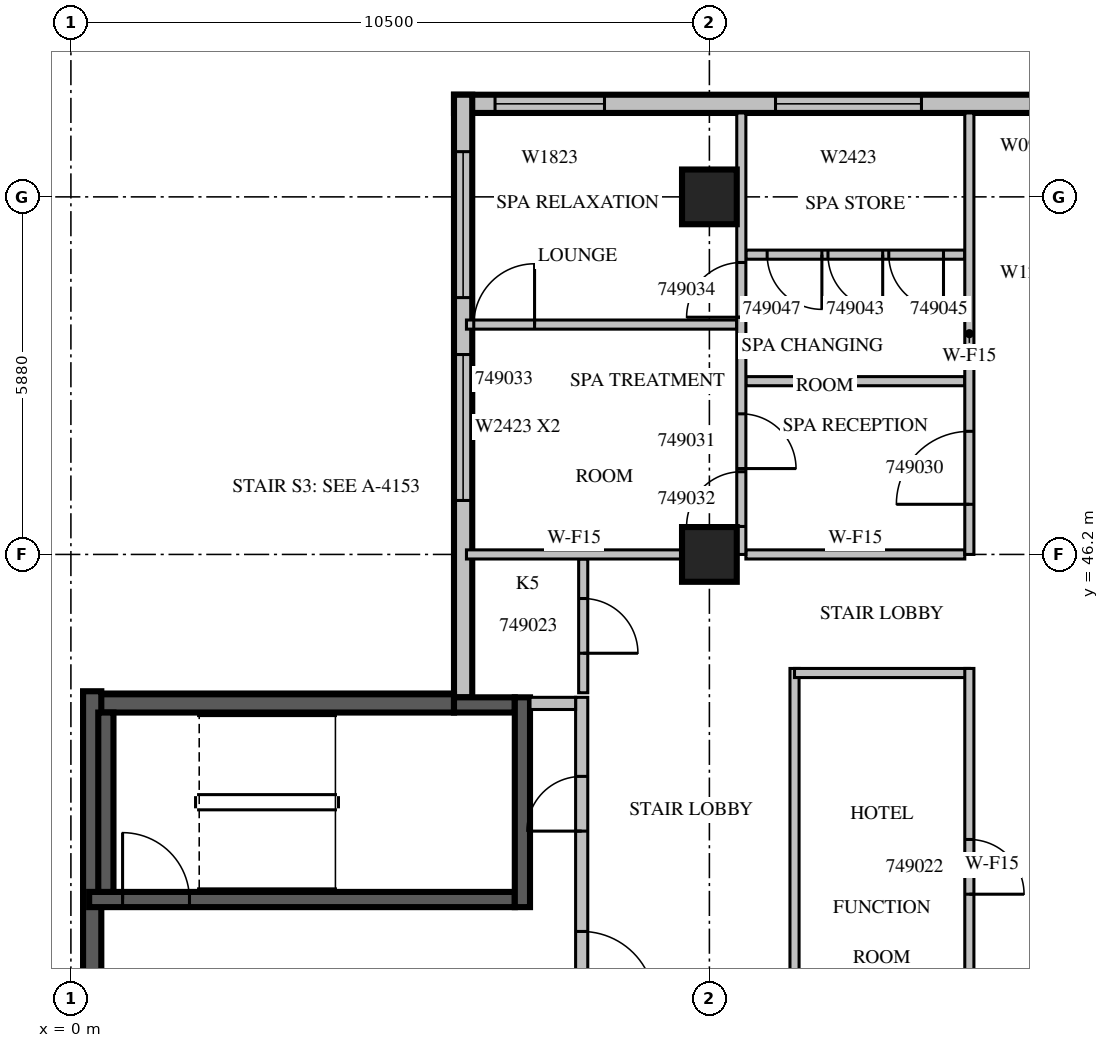
"""IFC4 building model, lengths in metres.
Left out: names, types, materials, properties, quantities, classifications, styles, units other than length and angle.
Written with IfcOpenShell. Run it as: python <this file> out.ifc"""

import sys

from ifc_helpers import new_model, si_unit, direction, frame, frame_2d, origin, origin_2d, place, context, subcontext, project, spatial, rectangle, extrude, source, transform, mapped, element, fill, save


model = new_model("IFC4")
c1 = context("Model", 3, precision=1e-05, world=origin(), true_north=direction((0.0, 1.0)))
c2 = subcontext(c1, "Body", "Model", "MODEL_VIEW")
j1 = project(units=[si_unit("LENGTHUNIT", "METRE"), si_unit("PLANEANGLEUNIT", "RADIAN")], contexts=[c1])
p1 = place(None, origin())
s1 = spatial("IfcSite", under=j1, at=p1, CompositionType="ELEMENT")
p2 = place(p1, origin())
s2 = spatial("IfcBuilding", under=s1, at=p2, CompositionType="ELEMENT")
p3 = place(p2, frame((0.0, 0.0, 219.6)))
s3 = spatial("IfcBuildingStorey", under=s2, at=p3, CompositionType="ELEMENT", Elevation=219.6)
m1 = source(origin(), c2, "Body", "SweptSolid", [
    extrude(rectangle(XDim=0.9, YDim=0.9, at=origin_2d()), origin(), (0.0, 0.0, 1.0), 3.8),
])
for number, where, z_axis, x_axis in (
    (1, (10.5, 46.2, 0.0), (0.0, 0.0, 1.0), (1.0, 0.0, 0.0)),
    (2, (10.5, 52.08, 0.0), (0.0, 0.0, 1.0), (1.0, 0.0, 0.0)),
):
    element("IfcColumn", number, at=place(p3, frame(where, z_axis=z_axis, x_axis=x_axis)), inside=s3, PredefinedType="COLUMN", context=c2, shape_type="MappedRepresentation", body=[
        mapped(m1, transform((0.0, 0.0, 0.0), scale=1.0)),
    ])
m2 = source(origin(), c2, "Body", "SweptSolid", [
    extrude(rectangle(XDim=10.5, YDim=0.3, at=frame_2d((5.25, 0.0))), origin(), (0.0, 0.0, 1.0), 3.4),
])
p4 = place(p3, frame((16.8, 53.61, 0.0), z_axis=(0.0, 0.0, 1.0), x_axis=(-1.0, 0.0, 0.0)))
e3 = element("IfcWall", 3, at=p4, inside=s3, PredefinedType="STANDARD", context=c2, shape_type="MappedRepresentation", body=[
    mapped(m2, transform((0.0, 0.0, 0.0), scale=1.0)),
])
m3 = source(origin(), c2, "Body", "SweptSolid", [
    extrude(rectangle(XDim=1.8, YDim=2.3, at=frame_2d((0.9, 1.15))), frame((0.0, 0.16, 0.0), z_axis=(0.0, -1.0, 0.0), x_axis=(1.0, 0.0, 0.0)), (0.0, 0.0, 1.0), 0.32),
])
p5 = place(p4, frame((8.025, 0.0, 0.6)))
e4 = element("IfcOpeningElement", 4, at=p5, cuts=e3, PredefinedType="OPENING", context=c2, shape_type="MappedRepresentation", body=[
    mapped(m3, transform((0.0, 0.0, 0.0), scale=1.0)),
])
m4 = source(origin(), c2, "Body", "SweptSolid", [
    extrude(rectangle(XDim=2.4, YDim=2.3, at=frame_2d((1.2, 1.15))), frame((0.0, 0.16, 0.0), z_axis=(0.0, -1.0, 0.0), x_axis=(1.0, 0.0, 0.0)), (0.0, 0.0, 1.0), 0.32),
])
p6 = place(p4, frame((2.812, 0.0, 0.6)))
e5 = element("IfcOpeningElement", 5, at=p6, cuts=e3, PredefinedType="OPENING", context=c2, shape_type="MappedRepresentation", body=[
    mapped(m4, transform((0.0, 0.0, 0.0), scale=1.0)),
])
m5 = source(origin(), c2, "Body", "SweptSolid", [
    extrude(rectangle(XDim=9.91, YDim=0.3, at=frame_2d((4.955, 0.0))), origin(), (0.0, 0.0, 1.0), 3.4),
])
p7 = place(p3, frame((6.45, 53.76, 0.0), z_axis=(0.0, 0.0, 1.0), x_axis=(0.0, -1.0, 0.0)))
e6 = element("IfcWall", 6, at=p7, inside=s3, PredefinedType="STANDARD", context=c2, shape_type="MappedRepresentation", body=[
    mapped(m5, transform((0.0, 0.0, 0.0), scale=1.0)),
])
p8 = place(p7, frame((4.272, 0.0, 0.6)))
e7 = element("IfcOpeningElement", 7, at=p8, cuts=e6, PredefinedType="OPENING", context=c2, shape_type="MappedRepresentation", body=[
    mapped(m4, transform((0.0, 0.0, 0.0), scale=1.0)),
])
p9 = place(p7, frame((0.936, 0.0, 0.6)))
e8 = element("IfcOpeningElement", 8, at=p9, cuts=e6, PredefinedType="OPENING", context=c2, shape_type="MappedRepresentation", body=[
    mapped(m4, transform((0.0, 0.0, 0.0), scale=1.0)),
])
m6 = source(origin(), c2, "Body", "SweptSolid", [
    extrude(rectangle(XDim=6.1, YDim=0.3, at=frame_2d((3.05, 0.0))), origin(), (0.0, 0.0, 1.0), 3.4),
])
p10 = place(p3, frame((6.3, 43.75, 0.0), z_axis=(0.0, 0.0, 1.0), x_axis=(-1.0, 0.0, 0.0)))
e9 = element("IfcWall", 9, at=p10, inside=s3, PredefinedType="SOLIDWALL", context=c2, shape_type="MappedRepresentation", body=[
    mapped(m6, transform((0.0, 0.0, 0.0), scale=1.0)),
])
m7 = source(origin(), c2, "Body", "SweptSolid", [
    extrude(rectangle(XDim=5.65, YDim=0.3, at=frame_2d((2.825, 0.0))), origin(), (0.0, 0.0, 1.0), 3.4),
])
p11 = place(p3, frame((0.35, 43.95, 0.0), z_axis=(0.0, 0.0, 1.0), x_axis=(0.0, -1.0, 0.0)))
e10 = element("IfcWall", 10, at=p11, inside=s3, PredefinedType="SOLIDWALL", context=c2, shape_type="MappedRepresentation", body=[
    mapped(m7, transform((0.0, 0.0, 0.0), scale=1.0)),
])
m8 = source(origin(), c2, "Body", "SweptSolid", [
    extrude(rectangle(XDim=7.0, YDim=0.25, at=frame_2d((3.5, 0.0))), origin(), (0.0, 0.0, 1.0), 3.4),
])
p12 = place(p3, frame((0.3, 40.525, 0.0), z_axis=(0.0, 0.0, 1.0), x_axis=(1.0, 0.0, 0.0)))
e11 = element("IfcWall", 11, at=p12, inside=s3, PredefinedType="SOLIDWALL", context=c2, shape_type="MappedRepresentation", body=[
    mapped(m8, transform((0.0, 0.0, 0.0), scale=1.0)),
])
m9 = source(origin(), c2, "Body", "SweptSolid", [
    extrude(rectangle(XDim=1.1, YDim=2.1, at=frame_2d((0.55, 1.05))), frame((0.0, 0.135, 0.0), z_axis=(0.0, -1.0, 0.0), x_axis=(1.0, 0.0, 0.0)), (0.0, 0.0, 1.0), 0.27),
])
p13 = place(p12, frame((0.55, 0.0, 0.0)))
e12 = element("IfcOpeningElement", 12, at=p13, cuts=e11, PredefinedType="OPENING", context=c2, shape_type="MappedRepresentation", body=[
    mapped(m9, transform((0.0, 0.0, 0.0), scale=1.0)),
])
m10 = source(origin(), c2, "Body", "SweptSolid", [
    extrude(rectangle(XDim=1.0, YDim=0.25, at=frame_2d((0.5, 0.0))), origin(), (0.0, 0.0, 1.0), 3.4),
])
p14 = place(p3, frame((6.3, 43.725, 0.0), z_axis=(0.0, 0.0, 1.0), x_axis=(1.0, 0.0, 0.0)))
e13 = element("IfcWall", 13, at=p14, inside=s3, PredefinedType="SOLIDWALL", context=c2, shape_type="MappedRepresentation", body=[
    mapped(m10, transform((0.0, 0.0, 0.0), scale=1.0)),
])
m11 = source(origin(), c2, "Body", "SweptSolid", [
    extrude(rectangle(XDim=3.45, YDim=0.25, at=frame_2d((1.725, 0.0))), origin(), (0.0, 0.0, 1.0), 3.4),
])
p15 = place(p3, frame((7.425, 40.4, 0.0), z_axis=(0.0, 0.0, 1.0), x_axis=(0.0, 1.0, 0.0)))
e14 = element("IfcWall", 14, at=p15, inside=s3, PredefinedType="SOLIDWALL", context=c2, shape_type="MappedRepresentation", body=[
    mapped(m11, transform((0.0, 0.0, 0.0), scale=1.0)),
])
m12 = source(origin(), c2, "Body", "SweptSolid", [
    extrude(rectangle(XDim=2.95, YDim=0.25, at=frame_2d((1.475, 0.0))), origin(), (0.0, 0.0, 1.0), 3.4),
])
p16 = place(p3, frame((0.575, 40.65, 0.0), z_axis=(0.0, 0.0, 1.0), x_axis=(0.0, 1.0, 0.0)))
e15 = element("IfcWall", 15, at=p16, inside=s3, PredefinedType="SOLIDWALL", context=c2, shape_type="MappedRepresentation", body=[
    mapped(m12, transform((0.0, 0.0, 0.0), scale=1.0)),
])
m13 = source(origin(), c2, "Body", "SweptSolid", [
    extrude(rectangle(XDim=5.45, YDim=0.2, at=frame_2d((2.725, 0.0))), origin(), (0.0, 0.0, 1.0), 3.4),
])
p17 = place(p3, frame((8.4, 38.4, 0.0), z_axis=(0.0, 0.0, 1.0), x_axis=(0.0, 1.0, 0.0)))
e16 = element("IfcWall", 16, at=p17, inside=s3, PredefinedType="PARTITIONING", context=c2, shape_type="MappedRepresentation", body=[
    mapped(m13, transform((0.0, 0.0, 0.0), scale=1.0)),
])
m14 = source(origin(), c2, "Body", "SweptSolid", [
    extrude(rectangle(XDim=1.2, YDim=2.1, at=frame_2d((0.6, 1.05))), frame((0.0, 0.11, 0.0), z_axis=(0.0, -1.0, 0.0), x_axis=(1.0, 0.0, 0.0)), (0.0, 0.0, 1.0), 0.22),
])
p18 = place(p17, frame((0.4, 0.0, 0.0)))
e17 = element("IfcOpeningElement", 17, at=p18, cuts=e16, PredefinedType="OPENING", context=c2, shape_type="MappedRepresentation", body=[
    mapped(m14, transform((0.0, 0.0, 0.0), scale=1.0)),
])
m15 = source(origin(), c2, "Body", "SweptSolid", [
    extrude(rectangle(XDim=0.9, YDim=2.1, at=frame_2d((0.45, 1.05))), frame((0.0, 0.11, 0.0), z_axis=(0.0, -1.0, 0.0), x_axis=(1.0, 0.0, 0.0)), (0.0, 0.0, 1.0), 0.22),
])
p19 = place(p17, frame((3.25, 0.0, 0.0)))
e18 = element("IfcOpeningElement", 18, at=p19, cuts=e16, PredefinedType="OPENING", context=c2, shape_type="MappedRepresentation", body=[
    mapped(m15, transform((0.0, 0.0, 0.0), scale=1.0)),
])
m16 = source(origin(), c2, "Body", "SweptSolid", [
    extrude(rectangle(XDim=0.75, YDim=0.2, at=frame_2d((0.375, 0.0))), origin(), (0.0, 0.0, 1.0), 3.4),
])
p20 = place(p3, frame((7.55, 43.75, 0.0), z_axis=(0.0, 0.0, 1.0), x_axis=(1.0, 0.0, 0.0)))
e19 = element("IfcWall", 19, at=p20, inside=s3, PredefinedType="PARTITIONING", context=c2, shape_type="MappedRepresentation", body=[
    mapped(m16, transform((0.0, 0.0, 0.0), scale=1.0)),
])
m17 = source(origin(), c2, "Body", "SweptSolid", [
    extrude(rectangle(XDim=6.45, YDim=0.15, at=frame_2d((3.225, 0.0))), origin(), (0.0, 0.0, 1.0), 3.4),
])
p21 = place(p3, frame((11.9, 44.325, 0.0), z_axis=(0.0, 0.0, 1.0), x_axis=(0.0, -1.0, 0.0)))
e20 = element("IfcWall", 20, at=p21, inside=s3, PredefinedType="PARTITIONING", context=c2, shape_type="MappedRepresentation", body=[
    mapped(m17, transform((0.0, 0.0, 0.0), scale=1.0)),
])
m18 = source(origin(), c2, "Body", "SweptSolid", [
    extrude(rectangle(XDim=2.875, YDim=0.15, at=frame_2d((1.438, 0.0))), origin(), (0.0, 0.0, 1.0), 3.4),
])
p22 = place(p3, frame((14.775, 44.25, 0.0), z_axis=(0.0, 0.0, 1.0), x_axis=(-1.0, 0.0, 0.0)))
e21 = element("IfcWall", 21, at=p22, inside=s3, PredefinedType="PARTITIONING", context=c2, shape_type="MappedRepresentation", body=[
    mapped(m18, transform((0.0, 0.0, 0.0), scale=1.0)),
])
p23 = place(p3, frame((14.775, 37.875, 0.0), z_axis=(0.0, 0.0, 1.0), x_axis=(0.0, 1.0, 0.0)))
e22 = element("IfcWall", 22, at=p23, inside=s3, PredefinedType="PARTITIONING", context=c2, shape_type="MappedRepresentation", body=[
    mapped(m17, transform((0.0, 0.0, 0.0), scale=1.0)),
])
m19 = source(origin(), c2, "Body", "SweptSolid", [
    extrude(rectangle(XDim=0.9, YDim=2.1, at=frame_2d((0.45, 1.05))), frame((0.0, 0.085, 0.0), z_axis=(0.0, -1.0, 0.0), x_axis=(1.0, 0.0, 0.0)), (0.0, 0.0, 1.0), 0.17),
])
p24 = place(p23, frame((2.737, 0.0, 0.0)))
e23 = element("IfcOpeningElement", 23, at=p24, cuts=e22, PredefinedType="OPENING", context=c2, shape_type="MappedRepresentation", body=[
    mapped(m19, transform((0.0, 0.0, 0.0), scale=1.0)),
])
m20 = source(origin(), c2, "Body", "SweptSolid", [
    extrude(rectangle(XDim=2.2, YDim=0.15, at=frame_2d((1.1, 0.0))), origin(), (0.0, 0.0, 1.0), 3.4),
])
p25 = place(p3, frame((8.425, 43.925, 0.0), z_axis=(0.0, 0.0, 1.0), x_axis=(0.0, 1.0, 0.0)))
e24 = element("IfcWall", 24, at=p25, inside=s3, PredefinedType="PARTITIONING", context=c2, shape_type="MappedRepresentation", body=[
    mapped(m20, transform((0.0, 0.0, 0.0), scale=1.0)),
])
p26 = place(p25, frame((0.65, 0.0, 0.0)))
e25 = element("IfcOpeningElement", 25, at=p26, cuts=e24, PredefinedType="OPENING", context=c2, shape_type="MappedRepresentation", body=[
    mapped(m19, transform((0.0, 0.0, 0.0), scale=1.0)),
])
m21 = source(origin(), c2, "Body", "SweptSolid", [
    extrude(rectangle(XDim=4.445, YDim=0.15, at=frame_2d((2.223, 0.0))), origin(), (0.0, 0.0, 1.0), 3.4),
])
p27 = place(p3, frame((10.95, 49.98, 0.0), z_axis=(0.0, 0.0, 1.0), x_axis=(-1.0, 0.0, 0.0)))
e26 = element("IfcWall", 26, at=p27, inside=s3, PredefinedType="PARTITIONING", context=c2, shape_type="MappedRepresentation", body=[
    mapped(m21, transform((0.0, 0.0, 0.0), scale=1.0)),
])
m22 = source(origin(), c2, "Body", "SweptSolid", [
    extrude(rectangle(XDim=1.0, YDim=2.1, at=frame_2d((0.5, 1.05))), frame((0.0, 0.085, 0.0), z_axis=(0.0, -1.0, 0.0), x_axis=(1.0, 0.0, 0.0)), (0.0, 0.0, 1.0), 0.17),
])
p28 = place(p27, frame((3.325, 0.0, 0.0)))
e27 = element("IfcOpeningElement", 27, at=p28, cuts=e26, PredefinedType="OPENING", context=c2, shape_type="MappedRepresentation", body=[
    mapped(m22, transform((0.0, 0.0, 0.0), scale=1.0)),
])
m23 = source(origin(), c2, "Body", "SweptSolid", [
    extrude(rectangle(XDim=3.6, YDim=0.15, at=frame_2d((1.8, 0.0))), origin(), (0.0, 0.0, 1.0), 3.4),
])
p29 = place(p3, frame((14.7, 49.049, 0.0), z_axis=(0.0, 0.0, 1.0), x_axis=(-1.0, 0.0, 0.0)))
e28 = element("IfcWall", 28, at=p29, inside=s3, PredefinedType="PARTITIONING", context=c2, shape_type="MappedRepresentation", body=[
    mapped(m23, transform((0.0, 0.0, 0.0), scale=1.0)),
])
p30 = place(p3, frame((14.7, 51.13, 0.0), z_axis=(0.0, 0.0, 1.0), x_axis=(-1.0, 0.0, 0.0)))
e29 = element("IfcWall", 29, at=p30, inside=s3, PredefinedType="PARTITIONING", context=c2, shape_type="MappedRepresentation", body=[
    mapped(m23, transform((0.0, 0.0, 0.0), scale=1.0)),
])
p31 = place(p30, frame((1.35, 0.0, 0.0)))
e30 = element("IfcOpeningElement", 30, at=p31, cuts=e29, PredefinedType="OPENING", context=c2, shape_type="MappedRepresentation", body=[
    mapped(m19, transform((0.0, 0.0, 0.0), scale=1.0)),
])
p32 = place(p30, frame((0.35, 0.0, 0.0)))
e31 = element("IfcOpeningElement", 31, at=p32, cuts=e29, PredefinedType="OPENING", context=c2, shape_type="MappedRepresentation", body=[
    mapped(m19, transform((0.0, 0.0, 0.0), scale=1.0)),
])
p33 = place(p30, frame((2.35, 0.0, 0.0)))
e32 = element("IfcOpeningElement", 32, at=p33, cuts=e29, PredefinedType="OPENING", context=c2, shape_type="MappedRepresentation", body=[
    mapped(m19, transform((0.0, 0.0, 0.0), scale=1.0)),
])
m24 = source(origin(), c2, "Body", "SweptSolid", [
    extrude(rectangle(XDim=3.546, YDim=0.15, at=frame_2d((1.773, 0.0))), origin(), (0.0, 0.0, 1.0), 3.4),
])
p34 = place(p3, frame((10.051, 46.2, 0.0), z_axis=(0.0, 0.0, 1.0), x_axis=(-1.0, 0.0, 0.0)))
e33 = element("IfcWall", 33, at=p34, inside=s3, PredefinedType="PARTITIONING", context=c2, shape_type="MappedRepresentation", body=[
    mapped(m24, transform((0.0, 0.0, 0.0), scale=1.0)),
])
p35 = place(p3, frame((14.7, 46.2, 0.0), z_axis=(0.0, 0.0, 1.0), x_axis=(-1.0, 0.0, 0.0)))
e34 = element("IfcWall", 34, at=p35, inside=s3, PredefinedType="PARTITIONING", context=c2, shape_type="MappedRepresentation", body=[
    mapped(m23, transform((0.0, 0.0, 0.0), scale=1.0)),
])
m25 = source(origin(), c2, "Body", "SweptSolid", [
    extrude(rectangle(XDim=7.26, YDim=0.15, at=frame_2d((3.63, 0.0))), origin(), (0.0, 0.0, 1.0), 3.4),
])
p36 = place(p3, frame((11.025, 46.2, 0.0), z_axis=(0.0, 0.0, 1.0), x_axis=(0.0, 1.0, 0.0)))
e35 = element("IfcWall", 35, at=p36, inside=s3, PredefinedType="PARTITIONING", context=c2, shape_type="MappedRepresentation", body=[
    mapped(m25, transform((0.0, 0.0, 0.0), scale=1.0)),
])
p37 = place(p36, frame((1.412, 0.0, 0.0)))
e36 = element("IfcOpeningElement", 36, at=p37, cuts=e35, PredefinedType="OPENING", context=c2, shape_type="MappedRepresentation", body=[
    mapped(m19, transform((0.0, 0.0, 0.0), scale=1.0)),
])
p38 = place(p36, frame((0.46, 0.0, 0.0)))
e37 = element("IfcOpeningElement", 37, at=p38, cuts=e35, PredefinedType="OPENING", context=c2, shape_type="MappedRepresentation", body=[
    mapped(m19, transform((0.0, 0.0, 0.0), scale=1.0)),
])
p39 = place(p36, frame((3.901, 0.0, 0.0)))
e38 = element("IfcOpeningElement", 38, at=p39, cuts=e35, PredefinedType="OPENING", context=c2, shape_type="MappedRepresentation", body=[
    mapped(m19, transform((0.0, 0.0, 0.0), scale=1.0)),
])
p40 = place(p3, frame((14.775, 46.2, 0.0), z_axis=(0.0, 0.0, 1.0), x_axis=(0.0, 1.0, 0.0)))
e39 = element("IfcWall", 39, at=p40, inside=s3, PredefinedType="PARTITIONING", context=c2, shape_type="MappedRepresentation", body=[
    mapped(m25, transform((0.0, 0.0, 0.0), scale=1.0)),
])
m26 = source(origin(), c2, "Body", "SweptSolid", [
    extrude(rectangle(XDim=1.2, YDim=2.1, at=frame_2d((0.6, 1.05))), frame((0.0, 0.085, 0.0), z_axis=(0.0, -1.0, 0.0), x_axis=(1.0, 0.0, 0.0)), (0.0, 0.0, 1.0), 0.17),
])
p41 = place(p40, frame((0.825, 0.0, 0.0)))
e40 = element("IfcOpeningElement", 40, at=p41, cuts=e39, PredefinedType="OPENING", context=c2, shape_type="MappedRepresentation", body=[
    mapped(m26, transform((0.0, 0.0, 0.0), scale=1.0)),
])
m27 = source(origin(), c2, "Body", "SweptSolid", [
    extrude(rectangle(XDim=1.8, YDim=2.3, at=frame_2d((0.9, 1.15))), frame((0.0, 0.03, 0.0), z_axis=(0.0, -1.0, 0.0), x_axis=(1.0, 0.0, 0.0)), (0.0, 0.0, 1.0), 0.06),
])
p42 = place(p5, origin())
e41 = element("IfcWindow", 41, at=p42, inside=s3, PartitioningType="SINGLE_PANEL", PredefinedType="WINDOW", context=c2, shape_type="MappedRepresentation", body=[
    mapped(m27, transform((0.0, 0.0, 0.0), scale=1.0)),
])
fill(e4, e41)
m28 = source(origin(), c2, "Body", "SweptSolid", [
    extrude(rectangle(XDim=2.4, YDim=2.3, at=frame_2d((1.2, 1.15))), frame((0.0, 0.03, 0.0), z_axis=(0.0, -1.0, 0.0), x_axis=(1.0, 0.0, 0.0)), (0.0, 0.0, 1.0), 0.06),
])
p43 = place(p6, origin())
e42 = element("IfcWindow", 42, at=p43, inside=s3, PartitioningType="SINGLE_PANEL", PredefinedType="WINDOW", context=c2, shape_type="MappedRepresentation", body=[
    mapped(m28, transform((0.0, 0.0, 0.0), scale=1.0)),
])
fill(e5, e42)
p44 = place(p8, origin())
e43 = element("IfcWindow", 43, at=p44, inside=s3, PartitioningType="SINGLE_PANEL", PredefinedType="WINDOW", context=c2, shape_type="MappedRepresentation", body=[
    mapped(m28, transform((0.0, 0.0, 0.0), scale=1.0)),
])
fill(e7, e43)
p45 = place(p9, origin())
e44 = element("IfcWindow", 44, at=p45, inside=s3, PartitioningType="SINGLE_PANEL", PredefinedType="WINDOW", context=c2, shape_type="MappedRepresentation", body=[
    mapped(m28, transform((0.0, 0.0, 0.0), scale=1.0)),
])
fill(e8, e44)
m29 = source(origin(), c2, "Body", "SweptSolid", [
    extrude(rectangle(XDim=1.1, YDim=2.1, at=frame_2d((0.55, 1.05))), frame((0.0, 0.025, 0.0), z_axis=(0.0, -1.0, 0.0), x_axis=(1.0, 0.0, 0.0)), (0.0, 0.0, 1.0), 0.05),
])
p46 = place(p13, origin())
e45 = element("IfcDoor", 45, at=p46, inside=s3, OperationType="SINGLE_SWING_LEFT", PredefinedType="DOOR", context=c2, shape_type="MappedRepresentation", body=[
    mapped(m29, transform((0.0, 0.0, 0.0), scale=1.0)),
])
fill(e12, e45)
m30 = source(origin(), c2, "Body", "SweptSolid", [
    extrude(rectangle(XDim=1.2, YDim=2.1, at=frame_2d((0.6, 1.05))), frame((0.0, 0.025, 0.0), z_axis=(0.0, -1.0, 0.0), x_axis=(1.0, 0.0, 0.0)), (0.0, 0.0, 1.0), 0.05),
])
p47 = place(p18, origin())
e46 = element("IfcDoor", 46, at=p47, inside=s3, OperationType="SINGLE_SWING_RIGHT", PredefinedType="DOOR", context=c2, shape_type="MappedRepresentation", body=[
    mapped(m30, transform((0.0, 0.0, 0.0), scale=1.0)),
])
fill(e17, e46)
m31 = source(origin(), c2, "Body", "SweptSolid", [
    extrude(rectangle(XDim=0.9, YDim=2.1, at=frame_2d((0.45, 1.05))), frame((0.0, 0.025, 0.0), z_axis=(0.0, -1.0, 0.0), x_axis=(1.0, 0.0, 0.0)), (0.0, 0.0, 1.0), 0.05),
])
p48 = place(p19, origin())
e47 = element("IfcDoor", 47, at=p48, inside=s3, OperationType="SINGLE_SWING_LEFT", PredefinedType="DOOR", context=c2, shape_type="MappedRepresentation", body=[
    mapped(m31, transform((0.0, 0.0, 0.0), scale=1.0)),
])
fill(e18, e47)
p49 = place(p24, origin())
e48 = element("IfcDoor", 48, at=p49, inside=s3, OperationType="SINGLE_SWING_RIGHT", PredefinedType="DOOR", context=c2, shape_type="MappedRepresentation", body=[
    mapped(m31, transform((0.0, 0.0, 0.0), scale=1.0)),
])
fill(e23, e48)
p50 = place(p26, origin())
e49 = element("IfcDoor", 49, at=p50, inside=s3, OperationType="SINGLE_SWING_RIGHT", PredefinedType="DOOR", context=c2, shape_type="MappedRepresentation", body=[
    mapped(m31, transform((0.0, 0.0, 0.0), scale=1.0)),
])
fill(e25, e49)
p51 = place(p41, origin())
e50 = element("IfcDoor", 50, at=p51, inside=s3, OperationType="SINGLE_SWING_LEFT", PredefinedType="DOOR", context=c2, shape_type="MappedRepresentation", body=[
    mapped(m30, transform((0.0, 0.0, 0.0), scale=1.0)),
])
fill(e40, e50)
p52 = place(p37, origin())
e51 = element("IfcDoor", 51, at=p52, inside=s3, OperationType="SINGLE_SWING_RIGHT", PredefinedType="DOOR", context=c2, shape_type="MappedRepresentation", body=[
    mapped(m31, transform((0.0, 0.0, 0.0), scale=1.0)),
])
fill(e36, e51)
p53 = place(p38, origin())
e52 = element("IfcDoor", 52, at=p53, inside=s3, OperationType="SINGLE_SWING_LEFT", PredefinedType="DOOR", context=c2, shape_type="MappedRepresentation", body=[
    mapped(m31, transform((0.0, 0.0, 0.0), scale=1.0)),
])
fill(e37, e52)
m32 = source(origin(), c2, "Body", "SweptSolid", [
    extrude(rectangle(XDim=1.0, YDim=2.1, at=frame_2d((0.5, 1.05))), frame((0.0, 0.025, 0.0), z_axis=(0.0, -1.0, 0.0), x_axis=(1.0, 0.0, 0.0)), (0.0, 0.0, 1.0), 0.05),
])
p54 = place(p28, origin())
e53 = element("IfcDoor", 53, at=p54, inside=s3, OperationType="SINGLE_SWING_RIGHT", PredefinedType="DOOR", context=c2, shape_type="MappedRepresentation", body=[
    mapped(m32, transform((0.0, 0.0, 0.0), scale=1.0)),
])
fill(e27, e53)
p55 = place(p39, origin())
e54 = element("IfcDoor", 54, at=p55, inside=s3, OperationType="SINGLE_SWING_LEFT", PredefinedType="DOOR", context=c2, shape_type="MappedRepresentation", body=[
    mapped(m31, transform((0.0, 0.0, 0.0), scale=1.0)),
])
fill(e38, e54)
p56 = place(p31, origin())
e55 = element("IfcDoor", 55, at=p56, inside=s3, OperationType="SINGLE_SWING_LEFT", PredefinedType="DOOR", context=c2, shape_type="MappedRepresentation", body=[
    mapped(m31, transform((0.0, 0.0, 0.0), scale=1.0)),
])
fill(e30, e55)
p57 = place(p32, origin())
e56 = element("IfcDoor", 56, at=p57, inside=s3, OperationType="SINGLE_SWING_LEFT", PredefinedType="DOOR", context=c2, shape_type="MappedRepresentation", body=[
    mapped(m31, transform((0.0, 0.0, 0.0), scale=1.0)),
])
fill(e31, e56)
p58 = place(p33, origin())
e57 = element("IfcDoor", 57, at=p58, inside=s3, OperationType="SINGLE_SWING_LEFT", PredefinedType="DOOR", context=c2, shape_type="MappedRepresentation", body=[
    mapped(m31, transform((0.0, 0.0, 0.0), scale=1.0)),
])
fill(e32, e57)
save(model, sys.argv[1])
